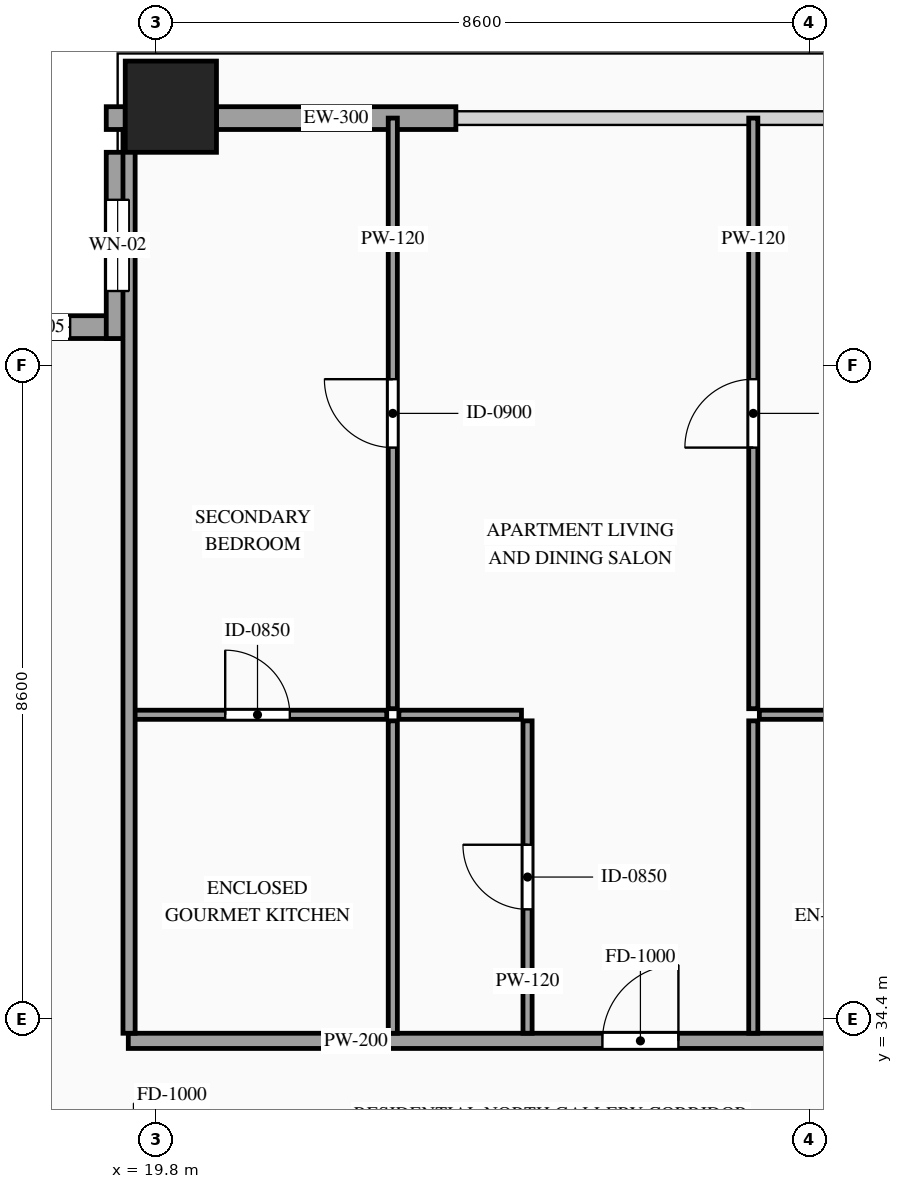
"""IFC4 building model, lengths in metres.
Left out: names, types, materials, properties, quantities, classifications, styles, units other than length and angle.
Written with IfcOpenShell. Run it as: python <this file> out.ifc"""

import sys

from ifc_helpers import new_model, si_unit, direction, frame, frame_2d, origin, origin_2d, place, context, subcontext, project, spatial, rectangle, hollow_rectangle, extrude, source, transform, mapped, element, fill, save


model = new_model("IFC4")
c1 = context("Model", 3, precision=1e-05, world=origin(), true_north=direction((0.0, 1.0)))
c2 = subcontext(c1, "Body", "Model", "MODEL_VIEW")
j1 = project(units=[si_unit("LENGTHUNIT", "METRE"), si_unit("PLANEANGLEUNIT", "RADIAN")], contexts=[c1])
p1 = place(None, origin())
s1 = spatial("IfcSite", under=j1, at=p1, CompositionType="ELEMENT")
p2 = place(p1, origin())
s2 = spatial("IfcBuilding", under=s1, at=p2, CompositionType="ELEMENT")
p3 = place(p2, frame((0.0, 0.0, 248.6)))
s3 = spatial("IfcBuildingStorey", under=s2, at=p3, CompositionType="ELEMENT", Elevation=248.6)
m1 = source(origin(), c2, "Body", "SweptSolid", [
    extrude(hollow_rectangle(XDim=1.2, YDim=1.2, WallThickness=0.055, at=origin_2d()), origin(), (0.0, 0.0, 1.0), 3.5),
])
p4 = place(p3, frame((20.0, 46.4, 0.0), z_axis=(0.0, 0.0, 1.0), x_axis=(1.0, 0.0, 0.0)))
e1 = element("IfcColumn", 1, at=p4, inside=s3, PredefinedType="COLUMN", context=c2, shape_type="MappedRepresentation", body=[
    mapped(m1, transform((0.0, 0.0, 0.0), scale=1.0)),
])
p5 = place(p3, frame((19.45, 43.5, 0.0), z_axis=(0.0, 0.0, 1.0), x_axis=(-1.0, 0.0, 0.0)))
e2 = element("IfcWall", 2, at=p5, inside=s3, PredefinedType="SOLIDWALL", context=c2, shape_type="SweptSolid", body=[
    extrude(rectangle(XDim=2.45, YDim=0.3, at=frame_2d((1.225, 0.0))), origin(), (0.0, 0.0, 1.0), 3.28),
])
p6 = place(p5, frame((0.775, 0.0, 0.85)))
e3 = element("IfcOpeningElement", 3, at=p6, cuts=e2, PredefinedType="OPENING", context=c2, shape_type="SweptSolid", body=[
    extrude(rectangle(XDim=0.9, YDim=1.5, at=frame_2d((0.45, 0.75))), frame((0.0, 0.165, 0.0), z_axis=(0.0, -1.0, 0.0), x_axis=(1.0, 0.0, 0.0)), (0.0, 0.0, 1.0), 0.33),
])
p7 = place(p3, frame((19.3, 45.8, 0.0), z_axis=(0.0, 0.0, 1.0), x_axis=(0.0, -1.0, 0.0)))
e4 = element("IfcWall", 4, at=p7, inside=s3, PredefinedType="SOLIDWALL", context=c2, shape_type="SweptSolid", body=[
    extrude(rectangle(XDim=2.45, YDim=0.3, at=frame_2d((1.225, 0.0))), origin(), (0.0, 0.0, 1.0), 3.28),
])
p8 = place(p7, frame((0.625, 0.0, 0.85)))
e5 = element("IfcOpeningElement", 5, at=p8, cuts=e4, PredefinedType="OPENING", context=c2, shape_type="SweptSolid", body=[
    extrude(rectangle(XDim=1.2, YDim=2.1, at=frame_2d((0.6, 1.05))), frame((0.0, 0.165, 0.0), z_axis=(0.0, -1.0, 0.0), x_axis=(1.0, 0.0, 0.0)), (0.0, 0.0, 1.0), 0.33),
])
m2 = source(origin(), c2, "Body", "SweptSolid", [
    extrude(rectangle(XDim=0.25, YDim=0.3, at=frame_2d((0.125, 0.0))), origin(), (0.0, 0.0, 1.0), 3.28),
])
p9 = place(p3, frame((19.15, 46.25, 0.0), z_axis=(0.0, 0.0, 1.0), x_axis=(1.0, 0.0, 0.0)))
e6 = element("IfcWall", 6, at=p9, inside=s3, PredefinedType="SOLIDWALL", context=c2, shape_type="MappedRepresentation", body=[
    mapped(m2, transform((0.0, 0.0, 0.0), scale=1.0)),
])
m3 = source(origin(), c2, "Body", "SweptSolid", [
    extrude(rectangle(XDim=3.15, YDim=0.3, at=frame_2d((1.575, 0.0))), origin(), (0.0, 0.0, 1.0), 2.835),
])
p10 = place(p3, frame((20.6, 46.25, 0.0), z_axis=(0.0, 0.0, 1.0), x_axis=(1.0, 0.0, 0.0)))
e7 = element("IfcWall", 7, at=p10, inside=s3, PredefinedType="SOLIDWALL", context=c2, shape_type="MappedRepresentation", body=[
    mapped(m3, transform((0.0, 0.0, 0.0), scale=1.0)),
])
p11 = place(p3, frame((19.44, 34.11, 0.0), z_axis=(0.0, 0.0, 1.0), x_axis=(1.0, 0.0, 0.0)))
e8 = element("IfcWall", 8, at=p11, inside=s3, PredefinedType="PARTITIONING", context=c2, shape_type="SweptSolid", body=[
    extrude(rectangle(XDim=11.861, YDim=0.2, at=frame_2d((5.931, 0.0))), origin(), (0.0, 0.0, 1.0), 3.28),
])
p12 = place(p11, frame((6.238, 0.0, 0.0)))
e9 = element("IfcOpeningElement", 9, at=p12, cuts=e8, PredefinedType="OPENING", context=c2, shape_type="SweptSolid", body=[
    extrude(rectangle(XDim=1.0, YDim=2.2, at=frame_2d((0.5, 1.1))), frame((0.0, 0.115, 0.0), z_axis=(0.0, -1.0, 0.0), x_axis=(1.0, 0.0, 0.0)), (0.0, 0.0, 1.0), 0.23),
])
p13 = place(p3, frame((19.44, 38.4, 0.0), z_axis=(0.0, 0.0, 1.0), x_axis=(1.0, 0.0, 0.0)))
e10 = element("IfcWall", 10, at=p13, inside=s3, PredefinedType="PARTITIONING", context=c2, shape_type="SweptSolid", body=[
    extrude(rectangle(XDim=3.4, YDim=0.12, at=frame_2d((1.7, 0.0))), origin(), (0.0, 0.0, 1.0), 3.28),
])
p14 = place(p13, frame((1.275, 0.0, 0.0)))
e11 = element("IfcOpeningElement", 11, at=p14, cuts=e10, PredefinedType="OPENING", context=c2, shape_type="SweptSolid", body=[
    extrude(rectangle(XDim=0.85, YDim=2.1, at=frame_2d((0.425, 1.05))), frame((0.0, 0.075, 0.0), z_axis=(0.0, -1.0, 0.0), x_axis=(1.0, 0.0, 0.0)), (0.0, 0.0, 1.0), 0.15),
])
m4 = source(origin(), c2, "Body", "SweptSolid", [
    extrude(rectangle(XDim=4.11, YDim=0.12, at=frame_2d((2.055, 0.0))), origin(), (0.0, 0.0, 1.0), 3.28),
])
p15 = place(p3, frame((22.92, 34.21, 0.0), z_axis=(0.0, 0.0, 1.0), x_axis=(0.0, 1.0, 0.0)))
e12 = element("IfcWall", 12, at=p15, inside=s3, PredefinedType="PARTITIONING", context=c2, shape_type="MappedRepresentation", body=[
    mapped(m4, transform((0.0, 0.0, 0.0), scale=1.0)),
])
m5 = source(origin(), c2, "Body", "SweptSolid", [
    extrude(rectangle(XDim=1.613, YDim=0.12, at=frame_2d((0.807, 0.0))), origin(), (0.0, 0.0, 1.0), 3.28),
])
p16 = place(p3, frame((23.0, 38.4, 0.0), z_axis=(0.0, 0.0, 1.0), x_axis=(1.0, 0.0, 0.0)))
e13 = element("IfcWall", 13, at=p16, inside=s3, PredefinedType="PARTITIONING", context=c2, shape_type="MappedRepresentation", body=[
    mapped(m5, transform((0.0, 0.0, 0.0), scale=1.0)),
])
p17 = place(p3, frame((24.693, 34.21, 0.0), z_axis=(0.0, 0.0, 1.0), x_axis=(0.0, 1.0, 0.0)))
e14 = element("IfcWall", 14, at=p17, inside=s3, PredefinedType="PARTITIONING", context=c2, shape_type="SweptSolid", body=[
    extrude(rectangle(XDim=4.11, YDim=0.12, at=frame_2d((2.055, 0.0))), origin(), (0.0, 0.0, 1.0), 3.28),
])
p18 = place(p17, frame((1.63, 0.0, 0.0)))
e15 = element("IfcOpeningElement", 15, at=p18, cuts=e14, PredefinedType="OPENING", context=c2, shape_type="SweptSolid", body=[
    extrude(rectangle(XDim=0.85, YDim=2.1, at=frame_2d((0.425, 1.05))), frame((0.0, 0.075, 0.0), z_axis=(0.0, -1.0, 0.0), x_axis=(1.0, 0.0, 0.0)), (0.0, 0.0, 1.0), 0.15),
])
p19 = place(p3, frame((27.743, 38.4, 0.0), z_axis=(0.0, 0.0, 1.0), x_axis=(1.0, 0.0, 0.0)))
e16 = element("IfcWall", 16, at=p19, inside=s3, PredefinedType="PARTITIONING", context=c2, shape_type="SweptSolid", body=[
    extrude(rectangle(XDim=3.558, YDim=0.12, at=frame_2d((1.779, 0.0))), origin(), (0.0, 0.0, 1.0), 3.28),
])
p20 = place(p19, frame((1.354, 0.0, 0.0)))
e17 = element("IfcOpeningElement", 17, at=p20, cuts=e16, PredefinedType="OPENING", context=c2, shape_type="SweptSolid", body=[
    extrude(rectangle(XDim=0.85, YDim=2.1, at=frame_2d((0.425, 1.05))), frame((0.0, 0.075, 0.0), z_axis=(0.0, -1.0, 0.0), x_axis=(1.0, 0.0, 0.0)), (0.0, 0.0, 1.0), 0.15),
])
p21 = place(p3, frame((27.663, 34.21, 0.0), z_axis=(0.0, 0.0, 1.0), x_axis=(0.0, 1.0, 0.0)))
e18 = element("IfcWall", 18, at=p21, inside=s3, PredefinedType="PARTITIONING", context=c2, shape_type="MappedRepresentation", body=[
    mapped(m4, transform((0.0, 0.0, 0.0), scale=1.0)),
])
p22 = place(p3, frame((22.92, 38.48, 0.0), z_axis=(0.0, 0.0, 1.0), x_axis=(0.0, 1.0, 0.0)))
e19 = element("IfcWall", 19, at=p22, inside=s3, PredefinedType="PARTITIONING", context=c2, shape_type="SweptSolid", body=[
    extrude(rectangle(XDim=7.77, YDim=0.12, at=frame_2d((3.885, 0.0))), origin(), (0.0, 0.0, 1.0), 3.28),
])
p23 = place(p22, frame((3.435, 0.0, 0.0)))
e20 = element("IfcOpeningElement", 20, at=p23, cuts=e19, PredefinedType="OPENING", context=c2, shape_type="SweptSolid", body=[
    extrude(rectangle(XDim=0.9, YDim=2.15, at=frame_2d((0.45, 1.075))), frame((0.0, 0.075, 0.0), z_axis=(0.0, -1.0, 0.0), x_axis=(1.0, 0.0, 0.0)), (0.0, 0.0, 1.0), 0.15),
])
p24 = place(p3, frame((27.663, 38.48, 0.0), z_axis=(0.0, 0.0, 1.0), x_axis=(0.0, 1.0, 0.0)))
e21 = element("IfcWall", 21, at=p24, inside=s3, PredefinedType="PARTITIONING", context=c2, shape_type="SweptSolid", body=[
    extrude(rectangle(XDim=7.77, YDim=0.12, at=frame_2d((3.885, 0.0))), origin(), (0.0, 0.0, 1.0), 3.28),
])
p25 = place(p24, frame((3.435, 0.0, 0.0)))
e22 = element("IfcOpeningElement", 22, at=p25, cuts=e21, PredefinedType="OPENING", context=c2, shape_type="SweptSolid", body=[
    extrude(rectangle(XDim=0.9, YDim=2.15, at=frame_2d((0.45, 1.075))), frame((0.0, 0.075, 0.0), z_axis=(0.0, -1.0, 0.0), x_axis=(1.0, 0.0, 0.0)), (0.0, 0.0, 1.0), 0.15),
])
m6 = source(origin(), c2, "Body", "SweptSolid", [
    extrude(rectangle(XDim=11.89, YDim=0.16, at=frame_2d((5.945, 0.0))), origin(), (0.0, 0.0, 1.0), 3.28),
])
p26 = place(p3, frame((19.45, 34.21, 0.0), z_axis=(0.0, 0.0, 1.0), x_axis=(0.0, 1.0, 0.0)))
e23 = element("IfcWall", 23, at=p26, inside=s3, PredefinedType="PARTITIONING", context=c2, shape_type="MappedRepresentation", body=[
    mapped(m6, transform((0.0, 0.0, 0.0), scale=1.0)),
])
m7 = source(origin(), c2, "Body", "SweptSolid", [
    extrude(rectangle(XDim=0.9, YDim=1.5, at=frame_2d((0.45, 0.75))), frame((0.0, 0.03, 0.0), z_axis=(0.0, -1.0, 0.0), x_axis=(1.0, 0.0, 0.0)), (0.0, 0.0, 1.0), 0.06),
])
p27 = place(p6, origin())
e24 = element("IfcWindow", 24, at=p27, inside=s3, PartitioningType="SINGLE_PANEL", PredefinedType="WINDOW", context=c2, shape_type="MappedRepresentation", body=[
    mapped(m7, transform((0.0, 0.0, 0.0), scale=1.0)),
])
fill(e3, e24)
m8 = source(origin(), c2, "Body", "SweptSolid", [
    extrude(rectangle(XDim=1.2, YDim=2.1, at=frame_2d((0.6, 1.05))), frame((0.0, 0.03, 0.0), z_axis=(0.0, -1.0, 0.0), x_axis=(1.0, 0.0, 0.0)), (0.0, 0.0, 1.0), 0.06),
])
p28 = place(p8, origin())
e25 = element("IfcWindow", 25, at=p28, inside=s3, PartitioningType="SINGLE_PANEL", PredefinedType="WINDOW", context=c2, shape_type="MappedRepresentation", body=[
    mapped(m8, transform((0.0, 0.0, 0.0), scale=1.0)),
])
fill(e5, e25)
m9 = source(origin(), c2, "Body", "SweptSolid", [
    extrude(rectangle(XDim=1.0, YDim=2.2, at=frame_2d((0.5, 1.1))), frame((0.0, 0.025, 0.0), z_axis=(0.0, -1.0, 0.0), x_axis=(1.0, 0.0, 0.0)), (0.0, 0.0, 1.0), 0.05),
])
p29 = place(p12, origin())
e26 = element("IfcDoor", 26, at=p29, inside=s3, OperationType="SINGLE_SWING_RIGHT", PredefinedType="DOOR", context=c2, shape_type="MappedRepresentation", body=[
    mapped(m9, transform((0.0, 0.0, 0.0), scale=1.0)),
])
fill(e9, e26)
m10 = source(origin(), c2, "Body", "SweptSolid", [
    extrude(rectangle(XDim=0.85, YDim=2.1, at=frame_2d((0.425, 1.05))), frame((0.0, 0.025, 0.0), z_axis=(0.0, -1.0, 0.0), x_axis=(1.0, 0.0, 0.0)), (0.0, 0.0, 1.0), 0.05),
])
p30 = place(p14, origin())
e27 = element("IfcDoor", 27, at=p30, inside=s3, OperationType="SINGLE_SWING_LEFT", PredefinedType="DOOR", context=c2, shape_type="MappedRepresentation", body=[
    mapped(m10, transform((0.0, 0.0, 0.0), scale=1.0)),
])
fill(e11, e27)
p31 = place(p18, origin())
e28 = element("IfcDoor", 28, at=p31, inside=s3, OperationType="SINGLE_SWING_RIGHT", PredefinedType="DOOR", context=c2, shape_type="MappedRepresentation", body=[
    mapped(m10, transform((0.0, 0.0, 0.0), scale=1.0)),
])
fill(e15, e28)
m11 = source(origin(), c2, "Body", "SweptSolid", [
    extrude(rectangle(XDim=0.9, YDim=2.15, at=frame_2d((0.45, 1.075))), frame((0.0, 0.025, 0.0), z_axis=(0.0, -1.0, 0.0), x_axis=(1.0, 0.0, 0.0)), (0.0, 0.0, 1.0), 0.05),
])
p32 = place(p23, origin())
e29 = element("IfcDoor", 29, at=p32, inside=s3, OperationType="SINGLE_SWING_RIGHT", PredefinedType="DOOR", context=c2, shape_type="MappedRepresentation", body=[
    mapped(m11, transform((0.0, 0.0, 0.0), scale=1.0)),
])
fill(e20, e29)
p33 = place(p25, origin())
e30 = element("IfcDoor", 30, at=p33, inside=s3, OperationType="SINGLE_SWING_LEFT", PredefinedType="DOOR", context=c2, shape_type="MappedRepresentation", body=[
    mapped(m11, transform((0.0, 0.0, 0.0), scale=1.0)),
])
fill(e22, e30)
save(model, sys.argv[1])
